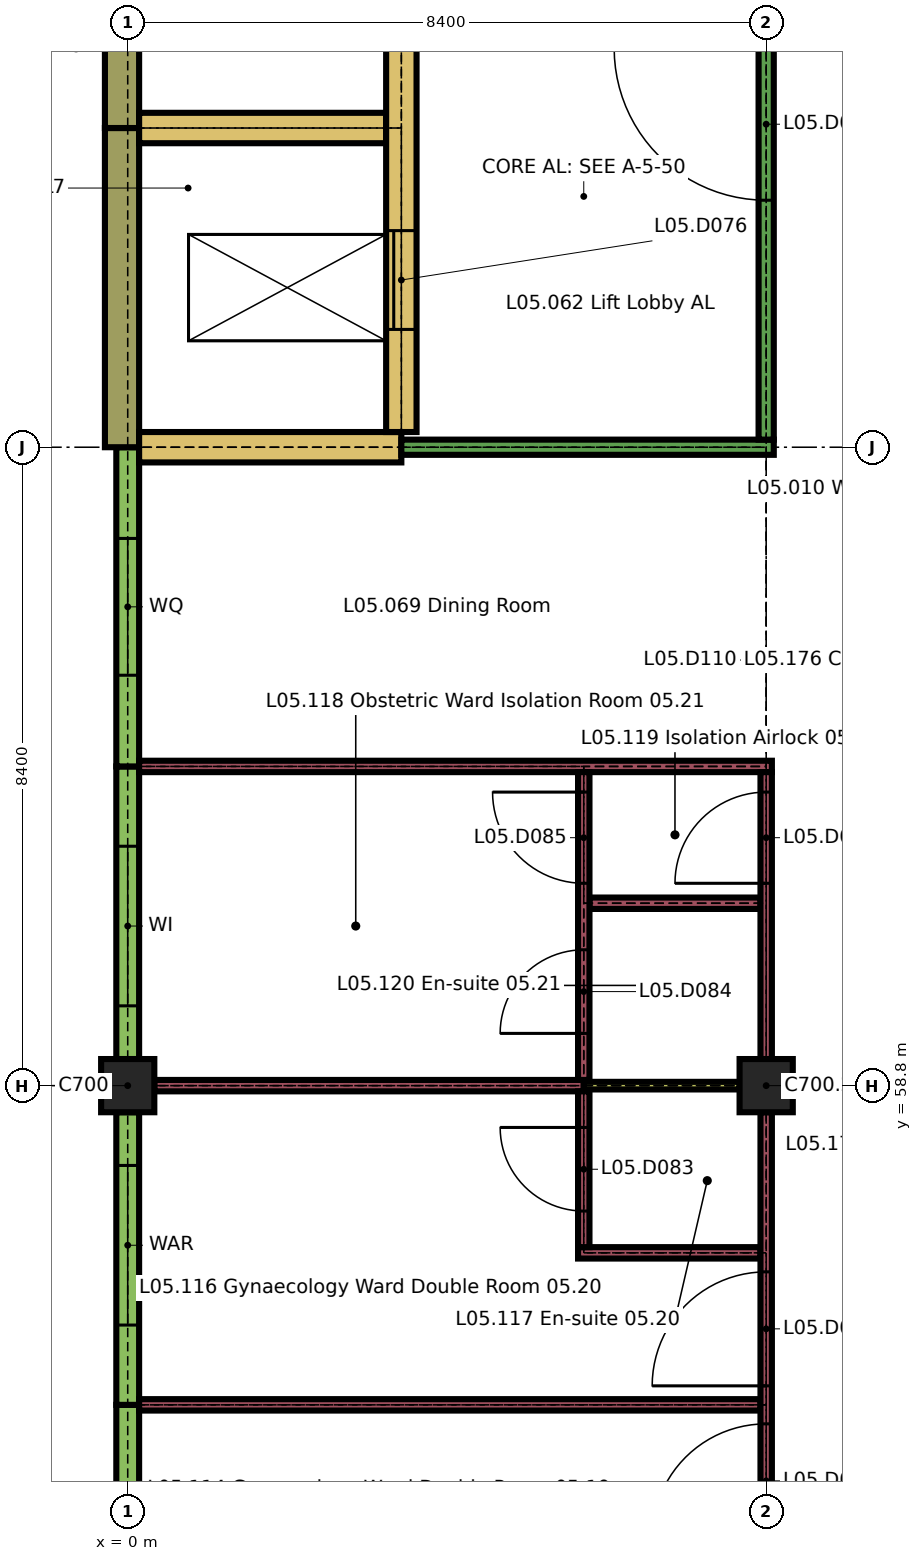
"""IFC4 building model, lengths in metres.
Left out: names, types, materials, properties, quantities, classifications, styles, units other than length and angle.
Written with IfcOpenShell. Run it as: python <this file> out.ifc"""

import sys

from ifc_helpers import new_model, si_unit, direction, frame, frame_2d, origin, origin_2d, place, context, subcontext, project, spatial, rectangle, extrude, element, fill, save


model = new_model("IFC4")
c1 = context("Model", 3, precision=1e-05, world=origin(), true_north=direction((0.0, 1.0)))
c2 = subcontext(c1, "Body", "Model", "MODEL_VIEW")
j1 = project(units=[si_unit("LENGTHUNIT", "METRE"), si_unit("PLANEANGLEUNIT", "RADIAN")], contexts=[c1])
p1 = place(None, origin())
s1 = spatial("IfcSite", under=j1, at=p1, CompositionType="ELEMENT")
p2 = place(p1, origin())
s2 = spatial("IfcBuilding", under=s1, at=p2, CompositionType="ELEMENT")
p3 = place(p2, frame((0.0, 0.0, 22.5)))
s3 = spatial("IfcBuildingStorey", under=s2, at=p3, CompositionType="ELEMENT", Elevation=22.5)
for number, where, z_axis, x_axis in (
    (1, (0.0, 58.8, 0.0), (0.0, 0.0, 1.0), (1.0, 0.0, 0.0)),
    (2, (8.4, 58.8, 0.0), (0.0, 0.0, 1.0), (1.0, 0.0, 0.0)),
):
    element("IfcColumn", number, at=place(p3, frame(where, z_axis=z_axis, x_axis=x_axis)), inside=s3, PredefinedType="COLUMN", context=c2, shape_type="SweptSolid", body=[
        extrude(rectangle(XDim=0.7, YDim=0.7, at=origin_2d()), origin(), (0.0, 0.0, 1.0), 3.26),
    ])
p4 = place(p3, frame((0.0, 50.75, 0.0), z_axis=(0.0, 0.0, 1.0), x_axis=(0.0, 1.0, 0.0)))
e3 = element("IfcWall", 3, at=p4, inside=s3, PredefinedType="SOLIDWALL", context=c2, shape_type="SweptSolid", body=[
    extrude(rectangle(XDim=3.85, YDim=0.3, at=frame_2d((1.925, 0.0))), origin(), (0.0, 0.0, 1.0), 2.96),
])
p5 = place(p4, frame((0.7, 0.0, 0.9)))
e4 = element("IfcOpeningElement", 4, at=p5, cuts=e3, PredefinedType="OPENING", context=c2, shape_type="SweptSolid", body=[
    extrude(rectangle(XDim=2.1, YDim=1.5, at=frame_2d((1.05, 0.75))), frame((0.0, 0.16, 0.0), z_axis=(0.0, -1.0, 0.0), x_axis=(1.0, 0.0, 0.0)), (0.0, 0.0, 1.0), 0.32),
])
p6 = place(p3, frame((0.0, 54.6, 0.0), z_axis=(0.0, 0.0, 1.0), x_axis=(0.0, 1.0, 0.0)))
e5 = element("IfcWall", 5, at=p6, inside=s3, PredefinedType="SOLIDWALL", context=c2, shape_type="SweptSolid", body=[
    extrude(rectangle(XDim=3.85, YDim=0.3, at=frame_2d((1.925, 0.0))), origin(), (0.0, 0.0, 1.0), 2.96),
])
p7 = place(p6, frame((1.05, 0.0, 0.9)))
e6 = element("IfcOpeningElement", 6, at=p7, cuts=e5, PredefinedType="OPENING", context=c2, shape_type="SweptSolid", body=[
    extrude(rectangle(XDim=2.1, YDim=1.5, at=frame_2d((1.05, 0.75))), frame((0.0, 0.16, 0.0), z_axis=(0.0, -1.0, 0.0), x_axis=(1.0, 0.0, 0.0)), (0.0, 0.0, 1.0), 0.32),
])
p8 = place(p3, frame((0.0, 59.15, 0.0), z_axis=(0.0, 0.0, 1.0), x_axis=(0.0, 1.0, 0.0)))
e7 = element("IfcWall", 7, at=p8, inside=s3, PredefinedType="SOLIDWALL", context=c2, shape_type="SweptSolid", body=[
    extrude(rectangle(XDim=3.85, YDim=0.3, at=frame_2d((1.925, 0.0))), origin(), (0.0, 0.0, 1.0), 2.96),
])
p9 = place(p8, frame((0.7, 0.0, 0.9)))
e8 = element("IfcOpeningElement", 8, at=p9, cuts=e7, PredefinedType="OPENING", context=c2, shape_type="SweptSolid", body=[
    extrude(rectangle(XDim=2.1, YDim=1.5, at=frame_2d((1.05, 0.75))), frame((0.0, 0.16, 0.0), z_axis=(0.0, -1.0, 0.0), x_axis=(1.0, 0.0, 0.0)), (0.0, 0.0, 1.0), 0.32),
])
p10 = place(p3, frame((0.0, 63.0, 0.0), z_axis=(0.0, 0.0, 1.0), x_axis=(0.0, 1.0, 0.0)))
e9 = element("IfcWall", 9, at=p10, inside=s3, PredefinedType="SOLIDWALL", context=c2, shape_type="SweptSolid", body=[
    extrude(rectangle(XDim=4.2, YDim=0.3, at=frame_2d((2.1, 0.0))), origin(), (0.0, 0.0, 1.0), 2.96),
])
p11 = place(p10, frame((1.2, 0.0, 1.05)))
e10 = element("IfcOpeningElement", 10, at=p11, cuts=e9, PredefinedType="OPENING", context=c2, shape_type="SweptSolid", body=[
    extrude(rectangle(XDim=1.8, YDim=1.2, at=frame_2d((0.9, 0.6))), frame((0.0, 0.16, 0.0), z_axis=(0.0, -1.0, 0.0), x_axis=(1.0, 0.0, 0.0)), (0.0, 0.0, 1.0), 0.32),
])
p12 = place(p3, frame((-0.075, 67.2, 0.0), z_axis=(0.0, 0.0, 1.0), x_axis=(0.0, 1.0, 0.0)))
e11 = element("IfcWall", 11, at=p12, inside=s3, PredefinedType="SOLIDWALL", context=c2, shape_type="SweptSolid", body=[
    extrude(rectangle(XDim=4.2, YDim=0.45, at=frame_2d((2.1, 0.0))), origin(), (0.0, 0.0, 1.0), 3.26),
])
p13 = place(p3, frame((-0.075, 71.4, 0.0), z_axis=(0.0, 0.0, 1.0), x_axis=(0.0, 1.0, 0.0)))
e12 = element("IfcWall", 12, at=p13, inside=s3, PredefinedType="SOLIDWALL", context=c2, shape_type="SweptSolid", body=[
    extrude(rectangle(XDim=4.2, YDim=0.45, at=frame_2d((2.1, 0.0))), origin(), (0.0, 0.0, 1.0), 3.26),
])
p14 = place(p3, frame((0.15, 54.6, 0.0), z_axis=(0.0, 0.0, 1.0), x_axis=(1.0, 0.0, 0.0)))
e13 = element("IfcWall", 13, at=p14, inside=s3, PredefinedType="PARTITIONING", context=c2, shape_type="SweptSolid", body=[
    extrude(rectangle(XDim=8.175, YDim=0.15, at=frame_2d((4.087, 0.0))), origin(), (0.0, 0.0, 1.0), 3.26),
])
p15 = place(p3, frame((5.925, 56.6, 0.0), z_axis=(0.0, 0.0, 1.0), x_axis=(1.0, 0.0, 0.0)))
e14 = element("IfcWall", 14, at=p15, inside=s3, PredefinedType="PARTITIONING", context=c2, shape_type="SweptSolid", body=[
    extrude(rectangle(XDim=2.4, YDim=0.15, at=frame_2d((1.2, 0.0))), origin(), (0.0, 0.0, 1.0), 3.26),
])
p16 = place(p3, frame((0.35, 58.8, 0.0), z_axis=(0.0, 0.0, 1.0), x_axis=(1.0, 0.0, 0.0)))
e15 = element("IfcWall", 15, at=p16, inside=s3, PredefinedType="PARTITIONING", context=c2, shape_type="SweptSolid", body=[
    extrude(rectangle(XDim=5.65, YDim=0.15, at=frame_2d((2.825, 0.0))), origin(), (0.0, 0.0, 1.0), 3.26),
])
p17 = place(p3, frame((6.0, 58.8, 0.0), z_axis=(0.0, 0.0, 1.0), x_axis=(1.0, 0.0, 0.0)))
e16 = element("IfcWall", 16, at=p17, inside=s3, PredefinedType="PARTITIONING", context=c2, shape_type="SweptSolid", body=[
    extrude(rectangle(XDim=2.05, YDim=0.1, at=frame_2d((1.025, 0.0))), origin(), (0.0, 0.0, 1.0), 3.26),
])
p18 = place(p3, frame((6.075, 61.2, 0.0), z_axis=(0.0, 0.0, 1.0), x_axis=(1.0, 0.0, 0.0)))
e17 = element("IfcWall", 17, at=p18, inside=s3, PredefinedType="PARTITIONING", context=c2, shape_type="SweptSolid", body=[
    extrude(rectangle(XDim=2.25, YDim=0.15, at=frame_2d((1.125, 0.0))), origin(), (0.0, 0.0, 1.0), 3.26),
])
p19 = place(p3, frame((0.15, 63.0, 0.0), z_axis=(0.0, 0.0, 1.0), x_axis=(1.0, 0.0, 0.0)))
e18 = element("IfcWall", 18, at=p19, inside=s3, PredefinedType="PARTITIONING", context=c2, shape_type="SweptSolid", body=[
    extrude(rectangle(XDim=8.325, YDim=0.15, at=frame_2d((4.163, 0.0))), origin(), (0.0, 0.0, 1.0), 3.26),
])
p20 = place(p3, frame((0.15, 67.2, 0.0), z_axis=(0.0, 0.0, 1.0), x_axis=(1.0, 0.0, 0.0)))
e19 = element("IfcWall", 19, at=p20, inside=s3, PredefinedType="SHEAR", context=c2, shape_type="SweptSolid", body=[
    extrude(rectangle(XDim=3.45, YDim=0.4, at=frame_2d((1.725, 0.0))), origin(), (0.0, 0.0, 1.0), 3.26),
])
p21 = place(p3, frame((3.6, 67.2, 0.0), z_axis=(0.0, 0.0, 1.0), x_axis=(1.0, 0.0, 0.0)))
e20 = element("IfcWall", 20, at=p21, inside=s3, PredefinedType="PARTITIONING", context=c2, shape_type="SweptSolid", body=[
    extrude(rectangle(XDim=4.9, YDim=0.2, at=frame_2d((2.45, 0.0))), origin(), (0.0, 0.0, 1.0), 3.26),
])
p22 = place(p3, frame((0.15, 71.4, 0.0), z_axis=(0.0, 0.0, 1.0), x_axis=(1.0, 0.0, 0.0)))
e21 = element("IfcWall", 21, at=p22, inside=s3, PredefinedType="SHEAR", context=c2, shape_type="SweptSolid", body=[
    extrude(rectangle(XDim=3.25, YDim=0.4, at=frame_2d((1.625, 0.0))), origin(), (0.0, 0.0, 1.0), 3.26),
])
p23 = place(p3, frame((3.6, 67.4, 0.0), z_axis=(0.0, 0.0, 1.0), x_axis=(0.0, 1.0, 0.0)))
e22 = element("IfcWall", 22, at=p23, inside=s3, PredefinedType="SHEAR", context=c2, shape_type="SweptSolid", body=[
    extrude(rectangle(XDim=8.0, YDim=0.4, at=frame_2d((4.0, 0.0))), origin(), (0.0, 0.0, 1.0), 3.26),
])
p24 = place(p23, frame((1.35, 0.0, 0.0)))
e23 = element("IfcOpeningElement", 23, at=p24, cuts=e22, PredefinedType="OPENING", context=c2, shape_type="SweptSolid", body=[
    extrude(rectangle(XDim=1.3, YDim=2.1, at=frame_2d((0.65, 1.05))), frame((0.0, 0.21, 0.0), z_axis=(0.0, -1.0, 0.0), x_axis=(1.0, 0.0, 0.0)), (0.0, 0.0, 1.0), 0.42),
])
p25 = place(p23, frame((5.45, 0.0, 0.0)))
e24 = element("IfcOpeningElement", 24, at=p25, cuts=e22, PredefinedType="OPENING", context=c2, shape_type="SweptSolid", body=[
    extrude(rectangle(XDim=1.1, YDim=2.1, at=frame_2d((0.55, 1.05))), frame((0.0, 0.21, 0.0), z_axis=(0.0, -1.0, 0.0), x_axis=(1.0, 0.0, 0.0)), (0.0, 0.0, 1.0), 0.42),
])
p26 = place(p3, frame((6.0, 56.675, 0.0), z_axis=(0.0, 0.0, 1.0), x_axis=(0.0, 1.0, 0.0)))
e25 = element("IfcWall", 25, at=p26, inside=s3, PredefinedType="PARTITIONING", context=c2, shape_type="SweptSolid", body=[
    extrude(rectangle(XDim=2.05, YDim=0.15, at=frame_2d((1.025, 0.0))), origin(), (0.0, 0.0, 1.0), 3.26),
])
p27 = place(p26, frame((0.475, 0.0, 0.0)))
e26 = element("IfcOpeningElement", 26, at=p27, cuts=e25, PredefinedType="OPENING", context=c2, shape_type="SweptSolid", body=[
    extrude(rectangle(XDim=1.1, YDim=2.1, at=frame_2d((0.55, 1.05))), frame((0.0, 0.085, 0.0), z_axis=(0.0, -1.0, 0.0), x_axis=(1.0, 0.0, 0.0)), (0.0, 0.0, 1.0), 0.17),
])
p28 = place(p3, frame((6.0, 58.875, 0.0), z_axis=(0.0, 0.0, 1.0), x_axis=(0.0, 1.0, 0.0)))
e27 = element("IfcWall", 27, at=p28, inside=s3, PredefinedType="PARTITIONING", context=c2, shape_type="SweptSolid", body=[
    extrude(rectangle(XDim=4.05, YDim=0.15, at=frame_2d((2.025, 0.0))), origin(), (0.0, 0.0, 1.0), 3.26),
])
p29 = place(p28, frame((0.613, 0.0, 0.0)))
e28 = element("IfcOpeningElement", 28, at=p29, cuts=e27, PredefinedType="OPENING", context=c2, shape_type="SweptSolid", body=[
    extrude(rectangle(XDim=1.1, YDim=2.1, at=frame_2d((0.55, 1.05))), frame((0.0, 0.085, 0.0), z_axis=(0.0, -1.0, 0.0), x_axis=(1.0, 0.0, 0.0)), (0.0, 0.0, 1.0), 0.17),
])
p30 = place(p28, frame((2.587, 0.0, 0.0)))
e29 = element("IfcOpeningElement", 29, at=p30, cuts=e27, PredefinedType="OPENING", context=c2, shape_type="SweptSolid", body=[
    extrude(rectangle(XDim=1.2, YDim=2.1, at=frame_2d((0.6, 1.05))), frame((0.0, 0.085, 0.0), z_axis=(0.0, -1.0, 0.0), x_axis=(1.0, 0.0, 0.0)), (0.0, 0.0, 1.0), 0.17),
])
p31 = place(p3, frame((8.4, 50.75, 0.0), z_axis=(0.0, 0.0, 1.0), x_axis=(0.0, 1.0, 0.0)))
e30 = element("IfcWall", 30, at=p31, inside=s3, PredefinedType="PARTITIONING", context=c2, shape_type="SweptSolid", body=[
    extrude(rectangle(XDim=7.7, YDim=0.15, at=frame_2d((3.85, 0.0))), origin(), (0.0, 0.0, 1.0), 3.26),
])
p32 = place(p31, frame((2.1, 0.0, 0.0)))
e31 = element("IfcOpeningElement", 31, at=p32, cuts=e30, PredefinedType="OPENING", context=c2, shape_type="SweptSolid", body=[
    extrude(rectangle(XDim=1.5, YDim=2.4, at=frame_2d((0.75, 1.2))), frame((0.0, 0.085, 0.0), z_axis=(0.0, -1.0, 0.0), x_axis=(1.0, 0.0, 0.0)), (0.0, 0.0, 1.0), 0.17),
])
p33 = place(p31, frame((4.1, 0.0, 0.0)))
e32 = element("IfcOpeningElement", 32, at=p33, cuts=e30, PredefinedType="OPENING", context=c2, shape_type="SweptSolid", body=[
    extrude(rectangle(XDim=1.5, YDim=2.4, at=frame_2d((0.75, 1.2))), frame((0.0, 0.085, 0.0), z_axis=(0.0, -1.0, 0.0), x_axis=(1.0, 0.0, 0.0)), (0.0, 0.0, 1.0), 0.17),
])
p34 = place(p3, frame((8.4, 59.15, 0.0), z_axis=(0.0, 0.0, 1.0), x_axis=(0.0, 1.0, 0.0)))
e33 = element("IfcWall", 33, at=p34, inside=s3, PredefinedType="PARTITIONING", context=c2, shape_type="SweptSolid", body=[
    extrude(rectangle(XDim=3.775, YDim=0.15, at=frame_2d((1.888, 0.0))), origin(), (0.0, 0.0, 1.0), 3.26),
])
p35 = place(p34, frame((2.312, 0.0, 0.0)))
e34 = element("IfcOpeningElement", 34, at=p35, cuts=e33, PredefinedType="OPENING", context=c2, shape_type="SweptSolid", body=[
    extrude(rectangle(XDim=1.2, YDim=2.1, at=frame_2d((0.6, 1.05))), frame((0.0, 0.085, 0.0), z_axis=(0.0, -1.0, 0.0), x_axis=(1.0, 0.0, 0.0)), (0.0, 0.0, 1.0), 0.17),
])
p36 = place(p3, frame((8.4, 67.3, 0.0), z_axis=(0.0, 0.0, 1.0), x_axis=(0.0, 1.0, 0.0)))
e35 = element("IfcWall", 35, at=p36, inside=s3, PredefinedType="PARTITIONING", context=c2, shape_type="SweptSolid", body=[
    extrude(rectangle(XDim=8.3, YDim=0.2, at=frame_2d((4.15, 0.0))), origin(), (0.0, 0.0, 1.0), 3.26),
])
p37 = place(p36, frame((3.15, 0.0, 0.0)))
e36 = element("IfcOpeningElement", 36, at=p37, cuts=e35, PredefinedType="OPENING", context=c2, shape_type="SweptSolid", body=[
    extrude(rectangle(XDim=2.0, YDim=2.4, at=frame_2d((1.0, 1.2))), frame((0.0, 0.11, 0.0), z_axis=(0.0, -1.0, 0.0), x_axis=(1.0, 0.0, 0.0)), (0.0, 0.0, 1.0), 0.22),
])
p38 = place(p7, origin())
e37 = element("IfcWindow", 37, at=p38, inside=s3, PartitioningType="DOUBLE_PANEL_VERTICAL", PredefinedType="WINDOW", context=c2, shape_type="SweptSolid", body=[
    extrude(rectangle(XDim=2.1, YDim=1.5, at=frame_2d((1.05, 0.75))), frame((0.0, 0.05, 0.0), z_axis=(0.0, -1.0, 0.0), x_axis=(1.0, 0.0, 0.0)), (0.0, 0.0, 1.0), 0.1),
])
fill(e6, e37)
p39 = place(p9, origin())
e38 = element("IfcWindow", 38, at=p39, inside=s3, PartitioningType="SINGLE_PANEL", PredefinedType="WINDOW", context=c2, shape_type="SweptSolid", body=[
    extrude(rectangle(XDim=2.1, YDim=1.5, at=frame_2d((1.05, 0.75))), frame((0.0, 0.045, 0.0), z_axis=(0.0, -1.0, 0.0), x_axis=(1.0, 0.0, 0.0)), (0.0, 0.0, 1.0), 0.09),
])
fill(e8, e38)
p40 = place(p11, origin())
e39 = element("IfcWindow", 39, at=p40, inside=s3, PartitioningType="DOUBLE_PANEL_VERTICAL", PredefinedType="WINDOW", context=c2, shape_type="SweptSolid", body=[
    extrude(rectangle(XDim=1.8, YDim=1.2, at=frame_2d((0.9, 0.6))), frame((0.0, 0.03, 0.0), z_axis=(0.0, -1.0, 0.0), x_axis=(1.0, 0.0, 0.0)), (0.0, 0.0, 1.0), 0.06),
])
fill(e10, e39)
p41 = place(p24, origin())
e40 = element("IfcDoor", 40, at=p41, inside=s3, OperationType="SLIDING_TO_LEFT", PredefinedType="DOOR", context=c2, shape_type="SweptSolid", body=[
    extrude(rectangle(XDim=1.3, YDim=2.1, at=frame_2d((0.65, 1.05))), frame((0.0, 0.025, 0.0), z_axis=(0.0, -1.0, 0.0), x_axis=(1.0, 0.0, 0.0)), (0.0, 0.0, 1.0), 0.05),
])
fill(e23, e40)
p42 = place(p27, origin())
e41 = element("IfcDoor", 41, at=p42, inside=s3, OperationType="SINGLE_SWING_LEFT", PredefinedType="DOOR", context=c2, shape_type="SweptSolid", body=[
    extrude(rectangle(XDim=1.1, YDim=2.1, at=frame_2d((0.55, 1.05))), frame((0.0, 0.025, 0.0), z_axis=(0.0, -1.0, 0.0), x_axis=(1.0, 0.0, 0.0)), (0.0, 0.0, 1.0), 0.05),
])
fill(e26, e41)
p43 = place(p29, origin())
e42 = element("IfcDoor", 42, at=p43, inside=s3, OperationType="SINGLE_SWING_RIGHT", PredefinedType="DOOR", context=c2, shape_type="SweptSolid", body=[
    extrude(rectangle(XDim=1.1, YDim=2.1, at=frame_2d((0.55, 1.05))), frame((0.0, 0.025, 0.0), z_axis=(0.0, -1.0, 0.0), x_axis=(1.0, 0.0, 0.0)), (0.0, 0.0, 1.0), 0.05),
])
fill(e28, e42)
p44 = place(p30, origin())
e43 = element("IfcDoor", 43, at=p44, inside=s3, OperationType="SINGLE_SWING_LEFT", PredefinedType="DOOR", context=c2, shape_type="SweptSolid", body=[
    extrude(rectangle(XDim=1.2, YDim=2.1, at=frame_2d((0.6, 1.05))), frame((0.0, 0.05, 0.0), z_axis=(0.0, -1.0, 0.0), x_axis=(1.0, 0.0, 0.0)), (0.0, 0.0, 1.0), 0.1),
])
fill(e29, e43)
p45 = place(p32, origin())
e44 = element("IfcDoor", 44, at=p45, inside=s3, OperationType="SINGLE_SWING_RIGHT", PredefinedType="DOOR", context=c2, shape_type="SweptSolid", body=[
    extrude(rectangle(XDim=1.5, YDim=2.4, at=frame_2d((0.75, 1.2))), frame((0.0, 0.03, 0.0), z_axis=(0.0, -1.0, 0.0), x_axis=(1.0, 0.0, 0.0)), (0.0, 0.0, 1.0), 0.06),
])
fill(e31, e44)
p46 = place(p33, origin())
e45 = element("IfcDoor", 45, at=p46, inside=s3, OperationType="SINGLE_SWING_RIGHT", PredefinedType="DOOR", context=c2, shape_type="SweptSolid", body=[
    extrude(rectangle(XDim=1.5, YDim=2.4, at=frame_2d((0.75, 1.2))), frame((0.0, 0.03, 0.0), z_axis=(0.0, -1.0, 0.0), x_axis=(1.0, 0.0, 0.0)), (0.0, 0.0, 1.0), 0.06),
])
fill(e32, e45)
p47 = place(p35, origin())
e46 = element("IfcDoor", 46, at=p47, inside=s3, OperationType="SINGLE_SWING_RIGHT", PredefinedType="DOOR", context=c2, shape_type="SweptSolid", body=[
    extrude(rectangle(XDim=1.2, YDim=2.1, at=frame_2d((0.6, 1.05))), frame((0.0, 0.05, 0.0), z_axis=(0.0, -1.0, 0.0), x_axis=(1.0, 0.0, 0.0)), (0.0, 0.0, 1.0), 0.1),
])
fill(e34, e46)
p48 = place(p37, origin())
e47 = element("IfcDoor", 47, at=p48, inside=s3, OperationType="SINGLE_SWING_LEFT", PredefinedType="DOOR", context=c2, shape_type="SweptSolid", body=[
    extrude(rectangle(XDim=2.0, YDim=2.4, at=frame_2d((1.0, 1.2))), frame((0.0, 0.03, 0.0), z_axis=(0.0, -1.0, 0.0), x_axis=(1.0, 0.0, 0.0)), (0.0, 0.0, 1.0), 0.06),
])
fill(e36, e47)
save(model, sys.argv[1])
